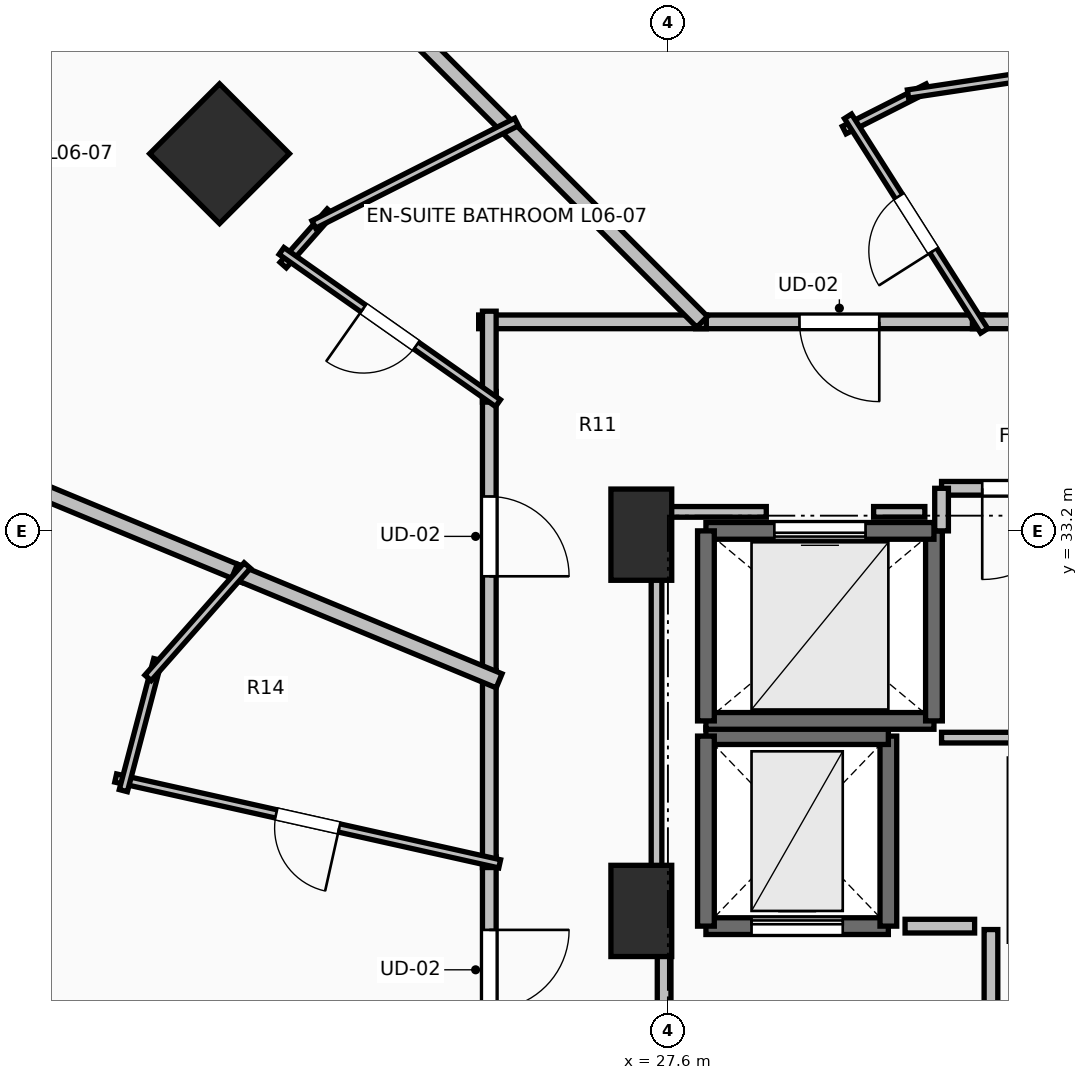
"""IFC4 building model, lengths in metres.
Left out: names, types, materials, properties, quantities, classifications, styles, units other than length and angle.
Written with IfcOpenShell. Run it as: python <this file> out.ifc"""

import sys

from ifc_helpers import new_model, si_unit, direction, frame, frame_2d, origin, origin_2d, place, context, subcontext, project, spatial, rectangle, extrude, element, fill, save


model = new_model("IFC4")
c1 = context("Model", 3, precision=1e-05, world=origin(), true_north=direction((0.0, 1.0)))
c2 = subcontext(c1, "Body", "Model", "MODEL_VIEW")
j1 = project(units=[si_unit("LENGTHUNIT", "METRE"), si_unit("PLANEANGLEUNIT", "RADIAN")], contexts=[c1])
p1 = place(None, origin())
s1 = spatial("IfcSite", under=j1, at=p1, CompositionType="ELEMENT")
p2 = place(p1, origin())
s2 = spatial("IfcBuilding", under=s1, at=p2, CompositionType="ELEMENT")
p3 = place(p2, frame((0.0, 0.0, 27.5)))
s3 = spatial("IfcBuildingStorey", under=s2, at=p3, CompositionType="ELEMENT", Elevation=27.5)
p4 = place(p3, frame((21.701, 38.162, 0.0), z_axis=(0.0, 0.0, 1.0), x_axis=(-0.707106781187, 0.707106781187, 0.0)))
e1 = element("IfcColumn", 1, at=p4, inside=s3, PredefinedType="COLUMN", context=c2, shape_type="SweptSolid", body=[
    extrude(rectangle(XDim=1.3, YDim=1.3, at=origin_2d()), origin(), (0.0, 0.0, 1.0), 3.5),
])
for number, where, z_axis, x_axis in (
    (2, (27.25, 28.2, 0.0), (0.0, 0.0, 1.0), (1.0, 0.0, 0.0)),
    (3, (27.25, 33.15, 0.0), (0.0, 0.0, 1.0), (1.0, 0.0, 0.0)),
):
    element("IfcColumn", number, at=place(p3, frame(where, z_axis=z_axis, x_axis=x_axis)), inside=s3, PredefinedType="PILASTER", context=c2, shape_type="SweptSolid", body=[
        extrude(rectangle(XDim=0.8, YDim=1.2, at=origin_2d()), origin(), (0.0, 0.0, 1.0), 3.5),
    ])
p5 = place(p3, frame((28.1, 28.0, 0.0), z_axis=(0.0, 0.0, 1.0), x_axis=(1.0, 0.0, 0.0)))
e4 = element("IfcWall", 4, at=p5, inside=s3, PredefinedType="SHEAR", context=c2, shape_type="SweptSolid", body=[
    extrude(rectangle(XDim=2.4, YDim=0.22, at=frame_2d((1.2, 0.0))), origin(), (0.0, 0.0, 1.0), 3.24),
])
p6 = place(p5, frame((0.6, 0.0, 0.0)))
e5 = element("IfcOpeningElement", 5, at=p6, cuts=e4, PredefinedType="OPENING", context=c2, shape_type="SweptSolid", body=[
    extrude(rectangle(XDim=1.2, YDim=2.2, at=frame_2d((0.6, 1.1))), frame((0.0, 0.125, 0.0), z_axis=(0.0, -1.0, 0.0), x_axis=(1.0, 0.0, 0.0)), (0.0, 0.0, 1.0), 0.25),
])
p7 = place(p3, frame((30.5, 28.0, 0.0), z_axis=(0.0, 0.0, 1.0), x_axis=(0.0, 1.0, 0.0)))
e6 = element("IfcWall", 6, at=p7, inside=s3, PredefinedType="SHEAR", context=c2, shape_type="SweptSolid", body=[
    extrude(rectangle(XDim=2.5, YDim=0.22, at=frame_2d((1.25, 0.0))), origin(), (0.0, 0.0, 1.0), 3.24),
])
p8 = place(p3, frame((30.5, 30.5, 0.0), z_axis=(0.0, 0.0, 1.0), x_axis=(-1.0, 0.0, 0.0)))
e7 = element("IfcWall", 7, at=p8, inside=s3, PredefinedType="SHEAR", context=c2, shape_type="SweptSolid", body=[
    extrude(rectangle(XDim=2.4, YDim=0.22, at=frame_2d((1.2, 0.0))), origin(), (0.0, 0.0, 1.0), 3.24),
])
p9 = place(p3, frame((28.1, 30.5, 0.0), z_axis=(0.0, 0.0, 1.0), x_axis=(0.0, -1.0, 0.0)))
e8 = element("IfcWall", 8, at=p9, inside=s3, PredefinedType="SHEAR", context=c2, shape_type="SweptSolid", body=[
    extrude(rectangle(XDim=2.5, YDim=0.22, at=frame_2d((1.25, 0.0))), origin(), (0.0, 0.0, 1.0), 3.24),
])
p10 = place(p3, frame((28.1, 30.7, 0.0), z_axis=(0.0, 0.0, 1.0), x_axis=(1.0, 0.0, 0.0)))
e9 = element("IfcWall", 9, at=p10, inside=s3, PredefinedType="SOLIDWALL", context=c2, shape_type="SweptSolid", body=[
    extrude(rectangle(XDim=3.0, YDim=0.22, at=frame_2d((1.5, 0.0))), origin(), (0.0, 0.0, 1.0), 3.24),
])
p11 = place(p3, frame((31.1, 30.7, 0.0), z_axis=(0.0, 0.0, 1.0), x_axis=(0.0, 1.0, 0.0)))
e10 = element("IfcWall", 10, at=p11, inside=s3, PredefinedType="SOLIDWALL", context=c2, shape_type="SweptSolid", body=[
    extrude(rectangle(XDim=2.5, YDim=0.22, at=frame_2d((1.25, 0.0))), origin(), (0.0, 0.0, 1.0), 3.24),
])
p12 = place(p3, frame((31.1, 33.2, 0.0), z_axis=(0.0, 0.0, 1.0), x_axis=(-1.0, 0.0, 0.0)))
e11 = element("IfcWall", 11, at=p12, inside=s3, PredefinedType="SOLIDWALL", context=c2, shape_type="SweptSolid", body=[
    extrude(rectangle(XDim=3.0, YDim=0.22, at=frame_2d((1.5, 0.0))), origin(), (0.0, 0.0, 1.0), 3.24),
])
p13 = place(p12, frame((0.9, 0.0, 0.0)))
e12 = element("IfcOpeningElement", 12, at=p13, cuts=e11, PredefinedType="OPENING", context=c2, shape_type="SweptSolid", body=[
    extrude(rectangle(XDim=1.2, YDim=2.2, at=frame_2d((0.6, 1.1))), frame((0.0, 0.125, 0.0), z_axis=(0.0, -1.0, 0.0), x_axis=(1.0, 0.0, 0.0)), (0.0, 0.0, 1.0), 0.25),
])
p14 = place(p3, frame((28.1, 33.2, 0.0), z_axis=(0.0, 0.0, 1.0), x_axis=(0.0, -1.0, 0.0)))
e13 = element("IfcWall", 13, at=p14, inside=s3, PredefinedType="SOLIDWALL", context=c2, shape_type="SweptSolid", body=[
    extrude(rectangle(XDim=2.5, YDim=0.22, at=frame_2d((1.25, 0.0))), origin(), (0.0, 0.0, 1.0), 3.24),
])
p15 = place(p3, frame((31.85, 24.045, 0.0), z_axis=(0.0, 0.0, 1.0), x_axis=(0.0, 1.0, 0.0)))
e14 = element("IfcWall", 14, at=p15, inside=s3, PredefinedType="PARTITIONING", context=c2, shape_type="SweptSolid", body=[
    extrude(rectangle(XDim=3.91, YDim=0.18, at=frame_2d((1.955, 0.0))), origin(), (0.0, 0.0, 1.0), 3.24),
])
p16 = place(p15, frame((1.355, 0.0, 0.0)))
e15 = element("IfcOpeningElement", 15, at=p16, cuts=e14, PredefinedType="OPENING", context=c2, shape_type="SweptSolid", body=[
    extrude(rectangle(XDim=1.2, YDim=2.15, at=frame_2d((0.6, 1.075))), frame((0.0, 0.105, 0.0), z_axis=(0.0, -1.0, 0.0), x_axis=(1.0, 0.0, 0.0)), (0.0, 0.0, 1.0), 0.21),
])
p17 = place(p3, frame((27.55, 28.0, 0.0), z_axis=(0.0, 0.0, 1.0), x_axis=(0.0, -1.0, 0.0)))
e16 = element("IfcWall", 16, at=p17, inside=s3, PredefinedType="PARTITIONING", context=c2, shape_type="SweptSolid", body=[
    extrude(rectangle(XDim=4.05, YDim=0.18, at=frame_2d((2.025, 0.0))), origin(), (0.0, 0.0, 1.0), 3.24),
])
p18 = place(p17, frame((1.425, 0.0, 0.0)))
e17 = element("IfcOpeningElement", 17, at=p18, cuts=e16, PredefinedType="OPENING", context=c2, shape_type="SweptSolid", body=[
    extrude(rectangle(XDim=1.2, YDim=2.15, at=frame_2d((0.6, 1.075))), frame((0.0, 0.105, 0.0), z_axis=(0.0, -1.0, 0.0), x_axis=(1.0, 0.0, 0.0)), (0.0, 0.0, 1.0), 0.21),
])
p19 = place(p3, frame((33.47, 33.76, 0.0), z_axis=(0.0, 0.0, 1.0), x_axis=(-1.0, 0.0, 0.0)))
e18 = element("IfcWall", 18, at=p19, inside=s3, PredefinedType="PARTITIONING", context=c2, shape_type="SweptSolid", body=[
    extrude(rectangle(XDim=2.27, YDim=0.18, at=frame_2d((1.135, 0.0))), origin(), (0.0, 0.0, 1.0), 3.24),
])
p20 = place(p19, frame((0.535, 0.0, 0.0)))
e19 = element("IfcOpeningElement", 19, at=p20, cuts=e18, PredefinedType="OPENING", context=c2, shape_type="SweptSolid", body=[
    extrude(rectangle(XDim=1.2, YDim=2.15, at=frame_2d((0.6, 1.075))), frame((0.0, 0.105, 0.0), z_axis=(0.0, -1.0, 0.0), x_axis=(1.0, 0.0, 0.0)), (0.0, 0.0, 1.0), 0.21),
])
p21 = place(p3, frame((31.2, 33.76, 0.0), z_axis=(0.0, 0.0, 1.0), x_axis=(0.0, -1.0, 0.0)))
e20 = element("IfcWall", 20, at=p21, inside=s3, PredefinedType="PARTITIONING", context=c2, shape_type="SweptSolid", body=[
    extrude(rectangle(XDim=0.56, YDim=0.18, at=frame_2d((0.28, 0.0))), origin(), (0.0, 0.0, 1.0), 3.24),
])
p22 = place(p3, frame((31.746, 35.95, 0.0), z_axis=(0.0, 0.0, 1.0), x_axis=(-1.0, 0.0, 0.0)))
e21 = element("IfcWall", 21, at=p22, inside=s3, PredefinedType="PARTITIONING", context=c2, shape_type="SweptSolid", body=[
    extrude(rectangle(XDim=3.781, YDim=0.18, at=frame_2d((1.891, 0.0))), origin(), (0.0, 0.0, 1.0), 2.432),
])
p23 = place(p22, frame((1.365, 0.0, 0.0)))
e22 = element("IfcOpeningElement", 22, at=p23, cuts=e21, PredefinedType="OPENING", context=c2, shape_type="SweptSolid", body=[
    extrude(rectangle(XDim=1.05, YDim=2.2, at=frame_2d((0.525, 1.1))), frame((0.0, 0.105, 0.0), z_axis=(0.0, -1.0, 0.0), x_axis=(1.0, 0.0, 0.0)), (0.0, 0.0, 1.0), 0.21),
])
p24 = place(p3, frame((33.954, 35.95, 0.0), z_axis=(0.0, 0.0, 1.0), x_axis=(-1.0, 0.0, 0.0)))
e23 = element("IfcWall", 23, at=p24, inside=s3, PredefinedType="PARTITIONING", context=c2, shape_type="SweptSolid", body=[
    extrude(rectangle(XDim=2.348, YDim=0.18, at=frame_2d((1.174, 0.0))), origin(), (0.0, 0.0, 1.0), 3.24),
])
p25 = place(p3, frame((25.25, 35.034, 0.0), z_axis=(0.0, 0.0, 1.0), x_axis=(0.0, -1.0, 0.0)))
e24 = element("IfcWall", 24, at=p25, inside=s3, PredefinedType="PARTITIONING", context=c2, shape_type="SweptSolid", body=[
    extrude(rectangle(XDim=3.813, YDim=0.18, at=frame_2d((1.906, 0.0))), origin(), (0.0, 0.0, 1.0), 2.432),
])
p26 = place(p25, frame((1.382, 0.0, 0.0)))
e25 = element("IfcOpeningElement", 25, at=p26, cuts=e24, PredefinedType="OPENING", context=c2, shape_type="SweptSolid", body=[
    extrude(rectangle(XDim=1.05, YDim=2.2, at=frame_2d((0.525, 1.1))), frame((0.0, 0.105, 0.0), z_axis=(0.0, -1.0, 0.0), x_axis=(1.0, 0.0, 0.0)), (0.0, 0.0, 1.0), 0.21),
])
p27 = place(p3, frame((28.105, 35.95, 0.0), z_axis=(0.0, 0.0, 1.0), x_axis=(-1.0, 0.0, 0.0)))
e26 = element("IfcWall", 26, at=p27, inside=s3, PredefinedType="PARTITIONING", context=c2, shape_type="SweptSolid", body=[
    extrude(rectangle(XDim=2.995, YDim=0.18, at=frame_2d((1.498, 0.0))), origin(), (0.0, 0.0, 1.0), 2.432),
])
p28 = place(p3, frame((25.25, 36.09, 0.0), z_axis=(0.0, 0.0, 1.0), x_axis=(0.0, -1.0, 0.0)))
e27 = element("IfcWall", 27, at=p28, inside=s3, PredefinedType="PARTITIONING", context=c2, shape_type="SweptSolid", body=[
    extrude(rectangle(XDim=1.196, YDim=0.18, at=frame_2d((0.598, 0.0))), origin(), (0.0, 0.0, 1.0), 2.432),
])
p29 = place(p3, frame((25.25, 28.911, 0.0), z_axis=(0.0, 0.0, 1.0), x_axis=(0.0, -1.0, 0.0)))
e28 = element("IfcWall", 28, at=p29, inside=s3, PredefinedType="PARTITIONING", context=c2, shape_type="SweptSolid", body=[
    extrude(rectangle(XDim=2.971, YDim=0.18, at=frame_2d((1.485, 0.0))), origin(), (0.0, 0.0, 1.0), 2.432),
])
p30 = place(p29, frame((0.96, 0.0, 0.0)))
e29 = element("IfcOpeningElement", 29, at=p30, cuts=e28, PredefinedType="OPENING", context=c2, shape_type="SweptSolid", body=[
    extrude(rectangle(XDim=1.05, YDim=2.2, at=frame_2d((0.525, 1.1))), frame((0.0, 0.105, 0.0), z_axis=(0.0, -1.0, 0.0), x_axis=(1.0, 0.0, 0.0)), (0.0, 0.0, 1.0), 0.21),
])
p31 = place(p3, frame((25.25, 31.361, 0.0), z_axis=(0.0, 0.0, 1.0), x_axis=(0.0, -1.0, 0.0)))
e30 = element("IfcWall", 30, at=p31, inside=s3, PredefinedType="PARTITIONING", context=c2, shape_type="SweptSolid", body=[
    extrude(rectangle(XDim=2.59, YDim=0.18, at=frame_2d((1.295, 0.0))), origin(), (0.0, 0.0, 1.0), 2.432),
])
p32 = place(p3, frame((29.208, 47.225, 0.0), z_axis=(0.0, 0.0, 1.0), x_axis=(0.382723985517, -0.923862733803, 0.0)))
e31 = element("IfcWall", 31, at=p32, inside=s3, PredefinedType="PARTITIONING", context=c2, shape_type="SweptSolid", body=[
    extrude(rectangle(XDim=12.204, YDim=0.2, at=frame_2d((6.102, 0.0))), origin(), (0.0, 0.0, 1.0), 2.432),
])
p33 = place(p3, frame((29.919, 38.473, 0.0), z_axis=(0.0, 0.0, 1.0), x_axis=(0.892084606746, 0.45186840386, 0.0)))
e32 = element("IfcWall", 32, at=p33, inside=s3, PredefinedType="PARTITIONING", context=c2, shape_type="SweptSolid", body=[
    extrude(rectangle(XDim=1.236, YDim=0.11, at=frame_2d((0.618, 0.0))), origin(), (0.0, 0.0, 1.0), 3.24),
])
p34 = place(p3, frame((30.759, 38.947, 0.0), z_axis=(0.0, 0.0, 1.0), x_axis=(0.988889867338, 0.148650026153, 0.0)))
e33 = element("IfcWall", 33, at=p34, inside=s3, PredefinedType="PARTITIONING", context=c2, shape_type="SweptSolid", body=[
    extrude(rectangle(XDim=1.928, YDim=0.11, at=frame_2d((0.964, 0.0))), origin(), (0.0, 0.0, 1.0), 3.24),
])
p35 = place(p3, frame((31.761, 35.832, 0.0), z_axis=(0.0, 0.0, 1.0), x_axis=(-0.535991614842, 0.844223305067, 0.0)))
e34 = element("IfcWall", 34, at=p35, inside=s3, PredefinedType="PARTITIONING", context=c2, shape_type="SweptSolid", body=[
    extrude(rectangle(XDim=3.343, YDim=0.11, at=frame_2d((1.672, 0.0))), origin(), (0.0, 0.0, 1.0), 2.432),
])
p36 = place(p35, frame((1.247, 0.0, 0.0)))
e35 = element("IfcOpeningElement", 35, at=p36, cuts=e34, PredefinedType="OPENING", context=c2, shape_type="SweptSolid", body=[
    extrude(rectangle(XDim=0.85, YDim=2.1, at=frame_2d((0.425, 1.05))), frame((0.0, 0.07, 0.0), z_axis=(0.0, -1.0, 0.0), x_axis=(1.0, 0.0, 0.0)), (0.0, 0.0, 1.0), 0.14),
])
p37 = place(p3, frame((20.247, 43.753, 0.0), z_axis=(0.0, 0.0, 1.0), x_axis=(0.707106781187, -0.707106781187, 0.0)))
e36 = element("IfcWall", 36, at=p37, inside=s3, PredefinedType="PARTITIONING", context=c2, shape_type="SweptSolid", body=[
    extrude(rectangle(XDim=11.035, YDim=0.2, at=frame_2d((5.518, 0.0))), origin(), (0.0, 0.0, 1.0), 2.432),
])
p38 = place(p3, frame((22.538, 36.697, 0.0), z_axis=(0.0, 0.0, 1.0), x_axis=(0.662242037053, 0.749289986827, 0.0)))
e37 = element("IfcWall", 37, at=p38, inside=s3, PredefinedType="PARTITIONING", context=c2, shape_type="SweptSolid", body=[
    extrude(rectangle(XDim=0.937, YDim=0.11, at=frame_2d((0.468, 0.0))), origin(), (0.0, 0.0, 1.0), 2.432),
])
p39 = place(p3, frame((22.941, 37.231, 0.0), z_axis=(0.0, 0.0, 1.0), x_axis=(0.892507731149, 0.451032094024, 0.0)))
e38 = element("IfcWall", 38, at=p39, inside=s3, PredefinedType="PARTITIONING", context=c2, shape_type="SweptSolid", body=[
    extrude(rectangle(XDim=2.989, YDim=0.11, at=frame_2d((1.495, 0.0))), origin(), (0.0, 0.0, 1.0), 2.432),
])
p40 = place(p3, frame((25.365, 34.881, 0.0), z_axis=(0.0, 0.0, 1.0), x_axis=(-0.81809360258, 0.575085087111, 0.0)))
e39 = element("IfcWall", 39, at=p40, inside=s3, PredefinedType="PARTITIONING", context=c2, shape_type="SweptSolid", body=[
    extrude(rectangle(XDim=3.481, YDim=0.11, at=frame_2d((1.741, 0.0))), origin(), (0.0, 0.0, 1.0), 2.432),
])
p41 = place(p40, frame((1.316, 0.0, 0.0)))
e40 = element("IfcOpeningElement", 40, at=p41, cuts=e39, PredefinedType="OPENING", context=c2, shape_type="SweptSolid", body=[
    extrude(rectangle(XDim=0.85, YDim=2.1, at=frame_2d((0.425, 1.05))), frame((0.0, 0.07, 0.0), z_axis=(0.0, -1.0, 0.0), x_axis=(1.0, 0.0, 0.0)), (0.0, 0.0, 1.0), 0.14),
])
p42 = place(p3, frame((12.207, 36.684, 0.0), z_axis=(0.0, 0.0, 1.0), x_axis=(0.923876032578, -0.382691881842, 0.0)))
e41 = element("IfcWall", 41, at=p42, inside=s3, PredefinedType="PARTITIONING", context=c2, shape_type="SweptSolid", body=[
    extrude(rectangle(XDim=10.63, YDim=0.2, at=frame_2d((5.315, 0.0))), origin(), (0.0, 0.0, 1.0), 2.624),
])
p43 = place(p3, frame((21.899, 32.669, 0.0), z_axis=(0.0, 0.0, 1.0), x_axis=(0.923843852071, -0.382769561211, 0.0)))
e42 = element("IfcWall", 42, at=p43, inside=s3, PredefinedType="PARTITIONING", context=c2, shape_type="SweptSolid", body=[
    extrude(rectangle(XDim=3.768, YDim=0.2, at=frame_2d((1.884, 0.0))), origin(), (0.0, 0.0, 1.0), 2.922),
])
p44 = place(p3, frame((25.387, 28.82, 0.0), z_axis=(0.0, 0.0, 1.0), x_axis=(-0.975933395621, 0.218068813248, 0.0)))
e43 = element("IfcWall", 43, at=p44, inside=s3, PredefinedType="PARTITIONING", context=c2, shape_type="SweptSolid", body=[
    extrude(rectangle(XDim=5.177, YDim=0.11, at=frame_2d((2.588, 0.0))), origin(), (0.0, 0.0, 1.0), 2.432),
])
p45 = place(p44, frame((2.163, 0.0, 0.0)))
e44 = element("IfcOpeningElement", 44, at=p45, cuts=e43, PredefinedType="OPENING", context=c2, shape_type="SweptSolid", body=[
    extrude(rectangle(XDim=0.85, YDim=2.1, at=frame_2d((0.425, 1.05))), frame((0.0, 0.07, 0.0), z_axis=(0.0, -1.0, 0.0), x_axis=(1.0, 0.0, 0.0)), (0.0, 0.0, 1.0), 0.14),
])
p46 = place(p3, frame((20.435, 29.783, 0.0), z_axis=(0.0, 0.0, 1.0), x_axis=(0.254378671262, 0.967104695267, 0.0)))
e45 = element("IfcWall", 45, at=p46, inside=s3, PredefinedType="PARTITIONING", context=c2, shape_type="SweptSolid", body=[
    extrude(rectangle(XDim=1.782, YDim=0.11, at=frame_2d((0.891, 0.0))), origin(), (0.0, 0.0, 1.0), 2.432),
])
p47 = place(p3, frame((20.76, 31.266, 0.0), z_axis=(0.0, 0.0, 1.0), x_axis=(0.662047420969, 0.749461948593, 0.0)))
e46 = element("IfcWall", 46, at=p47, inside=s3, PredefinedType="PARTITIONING", context=c2, shape_type="SweptSolid", body=[
    extrude(rectangle(XDim=1.972, YDim=0.11, at=frame_2d((0.986, 0.0))), origin(), (0.0, 0.0, 1.0), 3.24),
])
p48 = place(p3, frame((31.635, 28.0, 0.0), z_axis=(0.0, 0.0, 1.0), x_axis=(-1.0, 0.0, 0.0)))
e47 = element("IfcWall", 47, at=p48, inside=s3, PredefinedType="PARTITIONING", context=c2, shape_type="SweptSolid", body=[
    extrude(rectangle(XDim=0.915, YDim=0.18, at=frame_2d((0.458, 0.0))), origin(), (0.0, 0.0, 1.0), 3.24),
])
p49 = place(p3, frame((31.2, 30.48, 0.0), z_axis=(0.0, 0.0, 1.0), x_axis=(1.0, 0.0, 0.0)))
e48 = element("IfcWall", 48, at=p49, inside=s3, PredefinedType="PARTITIONING", context=c2, shape_type="SweptSolid", body=[
    extrude(rectangle(XDim=2.05, YDim=0.14, at=frame_2d((1.025, 0.0))), origin(), (0.0, 0.0, 1.0), 3.24),
])
p50 = place(p3, frame((27.45, 28.196, 0.0), z_axis=(0.0, 0.0, 1.0), x_axis=(0.0, 1.0, 0.0)))
e49 = element("IfcWall", 49, at=p50, inside=s3, PredefinedType="PARTITIONING", context=c2, shape_type="SweptSolid", body=[
    extrude(rectangle(XDim=5.254, YDim=0.14, at=frame_2d((2.627, 0.0))), origin(), (0.0, 0.0, 1.0), 2.432),
])
p51 = place(p3, frame((27.45, 33.45, 0.0), z_axis=(0.0, 0.0, 1.0), x_axis=(1.0, 0.0, 0.0)))
e50 = element("IfcWall", 50, at=p51, inside=s3, PredefinedType="PARTITIONING", context=c2, shape_type="SweptSolid", body=[
    extrude(rectangle(XDim=1.444, YDim=0.14, at=frame_2d((0.722, 0.0))), origin(), (0.0, 0.0, 1.0), 2.432),
])
p52 = place(p3, frame((30.306, 33.45, 0.0), z_axis=(0.0, 0.0, 1.0), x_axis=(1.0, 0.0, 0.0)))
e51 = element("IfcWall", 51, at=p52, inside=s3, PredefinedType="PARTITIONING", context=c2, shape_type="SweptSolid", body=[
    extrude(rectangle(XDim=0.674, YDim=0.14, at=frame_2d((0.337, 0.0))), origin(), (0.0, 0.0, 1.0), 3.24),
])
p53 = place(p6, origin())
e52 = element("IfcDoor", 52, at=p53, inside=s3, OperationType="SLIDING_TO_LEFT", PredefinedType="DOOR", context=c2, shape_type="SweptSolid", body=[
    extrude(rectangle(XDim=1.2, YDim=2.2, at=frame_2d((0.6, 1.1))), frame((0.0, 0.025, 0.0), z_axis=(0.0, -1.0, 0.0), x_axis=(1.0, 0.0, 0.0)), (0.0, 0.0, 1.0), 0.05),
])
fill(e5, e52)
p54 = place(p13, origin())
e53 = element("IfcDoor", 53, at=p54, inside=s3, OperationType="SLIDING_TO_LEFT", PredefinedType="DOOR", context=c2, shape_type="SweptSolid", body=[
    extrude(rectangle(XDim=1.2, YDim=2.2, at=frame_2d((0.6, 1.1))), frame((0.0, 0.025, 0.0), z_axis=(0.0, -1.0, 0.0), x_axis=(1.0, 0.0, 0.0)), (0.0, 0.0, 1.0), 0.05),
])
fill(e12, e53)
p55 = place(p20, origin())
e54 = element("IfcDoor", 54, at=p55, inside=s3, OperationType="SINGLE_SWING_RIGHT", PredefinedType="DOOR", context=c2, shape_type="SweptSolid", body=[
    extrude(rectangle(XDim=1.2, YDim=2.15, at=frame_2d((0.6, 1.075))), frame((0.0, 0.025, 0.0), z_axis=(0.0, -1.0, 0.0), x_axis=(1.0, 0.0, 0.0)), (0.0, 0.0, 1.0), 0.05),
])
fill(e19, e54)
p56 = place(p23, origin())
e55 = element("IfcDoor", 55, at=p56, inside=s3, OperationType="SINGLE_SWING_LEFT", PredefinedType="DOOR", context=c2, shape_type="SweptSolid", body=[
    extrude(rectangle(XDim=1.05, YDim=2.2, at=frame_2d((0.525, 1.1))), frame((0.0, 0.025, 0.0), z_axis=(0.0, -1.0, 0.0), x_axis=(1.0, 0.0, 0.0)), (0.0, 0.0, 1.0), 0.05),
])
fill(e22, e55)
p57 = place(p26, origin())
e56 = element("IfcDoor", 56, at=p57, inside=s3, OperationType="SINGLE_SWING_RIGHT", PredefinedType="DOOR", context=c2, shape_type="SweptSolid", body=[
    extrude(rectangle(XDim=1.05, YDim=2.2, at=frame_2d((0.525, 1.1))), frame((0.0, 0.025, 0.0), z_axis=(0.0, -1.0, 0.0), x_axis=(1.0, 0.0, 0.0)), (0.0, 0.0, 1.0), 0.05),
])
fill(e25, e56)
p58 = place(p30, origin())
e57 = element("IfcDoor", 57, at=p58, inside=s3, OperationType="SINGLE_SWING_LEFT", PredefinedType="DOOR", context=c2, shape_type="SweptSolid", body=[
    extrude(rectangle(XDim=1.05, YDim=2.2, at=frame_2d((0.525, 1.1))), frame((0.0, 0.025, 0.0), z_axis=(0.0, -1.0, 0.0), x_axis=(1.0, 0.0, 0.0)), (0.0, 0.0, 1.0), 0.05),
])
fill(e29, e57)
p59 = place(p36, origin())
e58 = element("IfcDoor", 58, at=p59, inside=s3, OperationType="SINGLE_SWING_LEFT", PredefinedType="DOOR", context=c2, shape_type="SweptSolid", body=[
    extrude(rectangle(XDim=0.85, YDim=2.1, at=frame_2d((0.425, 1.05))), frame((0.0, 0.025, 0.0), z_axis=(0.0, -1.0, 0.0), x_axis=(1.0, 0.0, 0.0)), (0.0, 0.0, 1.0), 0.05),
])
fill(e35, e58)
p60 = place(p41, origin())
e59 = element("IfcDoor", 59, at=p60, inside=s3, OperationType="SINGLE_SWING_RIGHT", PredefinedType="DOOR", context=c2, shape_type="SweptSolid", body=[
    extrude(rectangle(XDim=0.85, YDim=2.1, at=frame_2d((0.425, 1.05))), frame((0.0, 0.025, 0.0), z_axis=(0.0, -1.0, 0.0), x_axis=(1.0, 0.0, 0.0)), (0.0, 0.0, 1.0), 0.05),
])
fill(e40, e59)
p61 = place(p45, origin())
e60 = element("IfcDoor", 60, at=p61, inside=s3, OperationType="SINGLE_SWING_LEFT", PredefinedType="DOOR", context=c2, shape_type="SweptSolid", body=[
    extrude(rectangle(XDim=0.85, YDim=2.1, at=frame_2d((0.425, 1.05))), frame((0.0, 0.025, 0.0), z_axis=(0.0, -1.0, 0.0), x_axis=(1.0, 0.0, 0.0)), (0.0, 0.0, 1.0), 0.05),
])
fill(e44, e60)
save(model, sys.argv[1])
